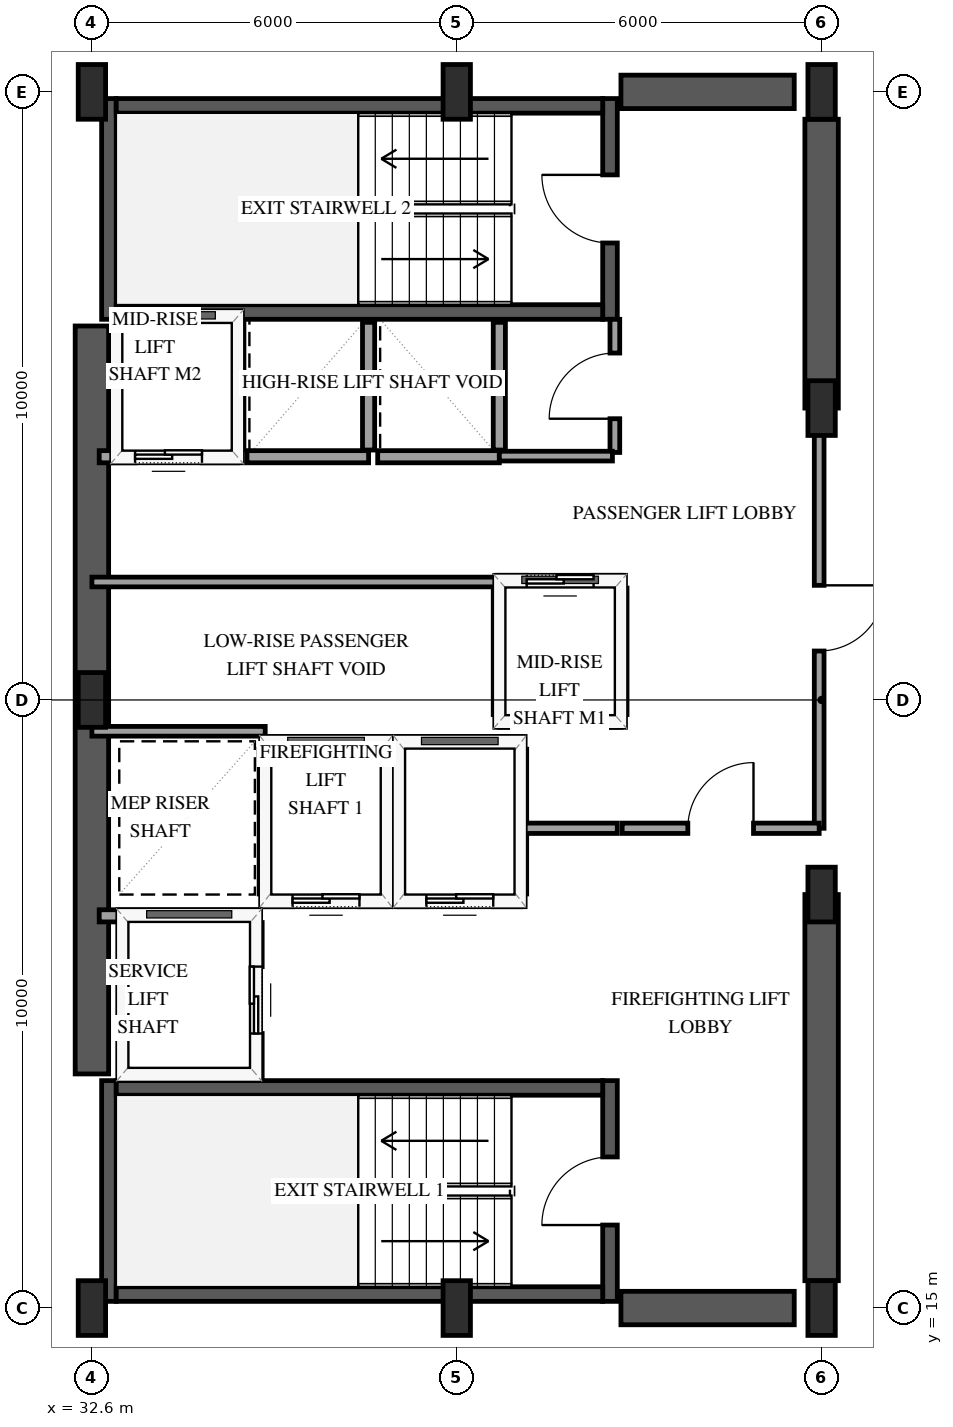
"""IFC4 building model, lengths in metres.
Left out: names, types, materials, properties, quantities, classifications, styles, units other than length and angle.
Written with IfcOpenShell. Run it as: python <this file> out.ifc"""

import sys

from ifc_helpers import new_model, si_unit, direction, frame, frame_2d, origin, origin_2d, place, context, subcontext, project, spatial, rectangle, extrude, element, fill, save


model = new_model("IFC4")
c1 = context("Model", 3, precision=1e-05, world=origin(), true_north=direction((0.0, 1.0)))
c2 = subcontext(c1, "Body", "Model", "MODEL_VIEW")
j1 = project(units=[si_unit("LENGTHUNIT", "METRE"), si_unit("PLANEANGLEUNIT", "RADIAN")], contexts=[c1])
p1 = place(None, origin())
s1 = spatial("IfcSite", under=j1, at=p1, CompositionType="ELEMENT")
p2 = place(p1, origin())
s2 = spatial("IfcBuilding", under=s1, at=p2, CompositionType="ELEMENT")
p3 = place(p2, frame((0.0, 0.0, 139.0)))
s3 = spatial("IfcBuildingStorey", under=s2, at=p3, CompositionType="ELEMENT", Elevation=139.0)
p4 = place(p3, frame((32.88, 15.11, 0.0), z_axis=(0.0, 0.0, 1.0), x_axis=(0.0, 1.0, 0.0)))
e1 = element("IfcWall", 1, at=p4, inside=s3, PredefinedType="SHEAR", context=c2, shape_type="SweptSolid", body=[
    extrude(rectangle(XDim=3.63, YDim=0.24, at=frame_2d((1.815, 0.0))), origin(), (0.0, 0.0, 1.0), 3.6),
])
p5 = place(p3, frame((41.12, 15.11, 0.0), z_axis=(0.0, 0.0, 1.0), x_axis=(0.0, 1.0, 0.0)))
e2 = element("IfcWall", 2, at=p5, inside=s3, PredefinedType="SHEAR", context=c2, shape_type="SweptSolid", body=[
    extrude(rectangle(XDim=3.63, YDim=0.24, at=frame_2d((1.815, 0.0))), origin(), (0.0, 0.0, 1.0), 3.6),
])
p6 = place(p5, frame((1.255, 0.0, 0.0)))
e3 = element("IfcOpeningElement", 3, at=p6, cuts=e2, PredefinedType="OPENING", context=c2, shape_type="SweptSolid", body=[
    extrude(rectangle(XDim=1.12, YDim=2.15, at=frame_2d((0.56, 1.075))), frame((0.0, 0.13, 0.0), z_axis=(0.0, -1.0, 0.0), x_axis=(1.0, 0.0, 0.0)), (0.0, 0.0, 1.0), 0.26),
])
for number, where, z_axis, x_axis in (
    (4, (33.0, 15.23, 0.0), (0.0, 0.0, 1.0), (1.0, 0.0, 0.0)),
    (5, (33.0, 18.62, 0.0), (0.0, 0.0, 1.0), (1.0, 0.0, 0.0)),
):
    element("IfcWall", number, at=place(p3, frame(where, z_axis=z_axis, x_axis=x_axis)), inside=s3, PredefinedType="SHEAR", context=c2, shape_type="SweptSolid", body=[
        extrude(rectangle(XDim=8.0, YDim=0.24, at=frame_2d((4.0, 0.0))), origin(), (0.0, 0.0, 1.0), 3.6),
    ])
p7 = place(p3, frame((32.88, 31.26, 0.0), z_axis=(0.0, 0.0, 1.0), x_axis=(0.0, 1.0, 0.0)))
e6 = element("IfcWall", 6, at=p7, inside=s3, PredefinedType="SHEAR", context=c2, shape_type="SweptSolid", body=[
    extrude(rectangle(XDim=3.63, YDim=0.24, at=frame_2d((1.815, 0.0))), origin(), (0.0, 0.0, 1.0), 3.6),
])
p8 = place(p3, frame((41.12, 31.26, 0.0), z_axis=(0.0, 0.0, 1.0), x_axis=(0.0, 1.0, 0.0)))
e7 = element("IfcWall", 7, at=p8, inside=s3, PredefinedType="SHEAR", context=c2, shape_type="SweptSolid", body=[
    extrude(rectangle(XDim=3.63, YDim=0.24, at=frame_2d((1.815, 0.0))), origin(), (0.0, 0.0, 1.0), 3.6),
])
p9 = place(p8, frame((1.255, 0.0, 0.0)))
e8 = element("IfcOpeningElement", 8, at=p9, cuts=e7, PredefinedType="OPENING", context=c2, shape_type="SweptSolid", body=[
    extrude(rectangle(XDim=1.12, YDim=2.15, at=frame_2d((0.56, 1.075))), frame((0.0, 0.13, 0.0), z_axis=(0.0, -1.0, 0.0), x_axis=(1.0, 0.0, 0.0)), (0.0, 0.0, 1.0), 0.26),
])
for number, where, z_axis, x_axis in (
    (9, (33.0, 31.38, 0.0), (0.0, 0.0, 1.0), (1.0, 0.0, 0.0)),
    (10, (33.0, 34.77, 0.0), (0.0, 0.0, 1.0), (1.0, 0.0, 0.0)),
):
    element("IfcWall", number, at=place(p3, frame(where, z_axis=z_axis, x_axis=x_axis)), inside=s3, PredefinedType="SHEAR", context=c2, shape_type="SweptSolid", body=[
        extrude(rectangle(XDim=8.0, YDim=0.24, at=frame_2d((4.0, 0.0))), origin(), (0.0, 0.0, 1.0), 3.6),
    ])
p10 = place(p3, frame((32.6, 18.85, 0.0), z_axis=(0.0, 0.0, 1.0), x_axis=(0.0, 1.0, 0.0)))
e11 = element("IfcWall", 11, at=p10, inside=s3, PredefinedType="SHEAR", context=c2, shape_type="SweptSolid", body=[
    extrude(rectangle(XDim=12.3, YDim=0.55, at=frame_2d((6.15, 0.0))), origin(), (0.0, 0.0, 1.0), 3.6),
])
for number, where, z_axis, x_axis in (
    (12, (41.3, 15.0, 0.0), (0.0, 0.0, 1.0), (1.0, 0.0, 0.0)),
    (13, (41.3, 35.0, 0.0), (0.0, 0.0, 1.0), (1.0, 0.0, 0.0)),
):
    element("IfcWall", number, at=place(p3, frame(where, z_axis=z_axis, x_axis=x_axis)), inside=s3, PredefinedType="SHEAR", context=c2, shape_type="SweptSolid", body=[
        extrude(rectangle(XDim=2.85, YDim=0.55, at=frame_2d((1.425, 0.0))), origin(), (0.0, 0.0, 1.0), 3.6),
    ])
p11 = place(p3, frame((44.6, 15.45, 0.0), z_axis=(0.0, 0.0, 1.0), x_axis=(0.0, 1.0, 0.0)))
e14 = element("IfcWall", 14, at=p11, inside=s3, PredefinedType="SHEAR", context=c2, shape_type="SweptSolid", body=[
    extrude(rectangle(XDim=6.35, YDim=0.55, at=frame_2d((3.175, 0.0))), origin(), (0.0, 0.0, 1.0), 3.6),
])
p12 = place(p3, frame((44.6, 29.8, 0.0), z_axis=(0.0, 0.0, 1.0), x_axis=(0.0, 1.0, 0.0)))
e15 = element("IfcWall", 15, at=p12, inside=s3, PredefinedType="SHEAR", context=c2, shape_type="SweptSolid", body=[
    extrude(rectangle(XDim=4.75, YDim=0.55, at=frame_2d((2.375, 0.0))), origin(), (0.0, 0.0, 1.0), 3.6),
])
for number, where, z_axis, x_axis in (
    (16, (32.6, 15.0, -0.3), (0.0, 0.0, 1.0), (1.0, 0.0, 0.0)),
    (17, (32.6, 25.0, -0.3), (0.0, 0.0, 1.0), (1.0, 0.0, 0.0)),
    (18, (32.6, 35.0, -0.3), (0.0, 0.0, 1.0), (1.0, 0.0, 0.0)),
    (19, (38.6, 15.0, -0.3), (0.0, 0.0, 1.0), (1.0, 0.0, 0.0)),
    (20, (38.6, 35.0, -0.3), (0.0, 0.0, 1.0), (1.0, 0.0, 0.0)),
    (21, (44.6, 15.0, -0.3), (0.0, 0.0, 1.0), (1.0, 0.0, 0.0)),
    (22, (44.6, 21.8, -0.3), (0.0, 0.0, 1.0), (1.0, 0.0, 0.0)),
    (23, (44.6, 29.8, -0.3), (0.0, 0.0, 1.0), (1.0, 0.0, 0.0)),
    (24, (44.6, 35.0, -0.3), (0.0, 0.0, 1.0), (1.0, 0.0, 0.0)),
):
    element("IfcColumn", number, at=place(p3, frame(where, z_axis=z_axis, x_axis=x_axis)), inside=s3, PredefinedType="PILASTER", context=c2, shape_type="SweptSolid", body=[
        extrude(rectangle(XDim=0.45, YDim=0.9, at=origin_2d()), origin(), (0.0, 0.0, 1.0), 3.9),
    ])
p13 = place(p3, frame((35.45, 21.7, 0.0), z_axis=(0.0, 0.0, 1.0), x_axis=(1.0, 0.0, 0.0)))
e25 = element("IfcWall", 25, at=p13, inside=s3, PredefinedType="SOLIDWALL", context=c2, shape_type="SweptSolid", body=[
    extrude(rectangle(XDim=2.0, YDim=0.2, at=frame_2d((1.0, 0.0))), origin(), (0.0, 0.0, 1.0), 3.3),
])
p14 = place(p13, frame((0.45, 0.0, 0.0)))
e26 = element("IfcOpeningElement", 26, at=p14, cuts=e25, PredefinedType="OPENING", context=c2, shape_type="SweptSolid", body=[
    extrude(rectangle(XDim=1.1, YDim=2.15, at=frame_2d((0.55, 1.075))), frame((0.0, 0.11, 0.0), z_axis=(0.0, -1.0, 0.0), x_axis=(1.0, 0.0, 0.0)), (0.0, 0.0, 1.0), 0.22),
])
p15 = place(p3, frame((35.45, 24.3, 0.0), z_axis=(0.0, 0.0, 1.0), x_axis=(1.0, 0.0, 0.0)))
e27 = element("IfcWall", 27, at=p15, inside=s3, PredefinedType="SOLIDWALL", context=c2, shape_type="SweptSolid", body=[
    extrude(rectangle(XDim=2.0, YDim=0.2, at=frame_2d((1.0, 0.0))), origin(), (0.0, 0.0, 1.0), 3.3),
])
for number, where, z_axis, x_axis in (
    (28, (35.45, 21.81, 0.0), (0.0, 0.0, 1.0), (0.0, 1.0, 0.0)),
    (29, (37.45, 21.81, 0.0), (0.0, 0.0, 1.0), (0.0, 1.0, 0.0)),
):
    element("IfcWall", number, at=place(p3, frame(where, z_axis=z_axis, x_axis=x_axis)), inside=s3, PredefinedType="SOLIDWALL", context=c2, shape_type="SweptSolid", body=[
        extrude(rectangle(XDim=2.38, YDim=0.2, at=frame_2d((1.19, 0.0))), origin(), (0.0, 0.0, 1.0), 3.3),
    ])
p16 = place(p3, frame((37.65, 21.7, 0.0), z_axis=(0.0, 0.0, 1.0), x_axis=(1.0, 0.0, 0.0)))
e30 = element("IfcWall", 30, at=p16, inside=s3, PredefinedType="SOLIDWALL", context=c2, shape_type="SweptSolid", body=[
    extrude(rectangle(XDim=2.0, YDim=0.2, at=frame_2d((1.0, 0.0))), origin(), (0.0, 0.0, 1.0), 3.3),
])
p17 = place(p16, frame((0.45, 0.0, 0.0)))
e31 = element("IfcOpeningElement", 31, at=p17, cuts=e30, PredefinedType="OPENING", context=c2, shape_type="SweptSolid", body=[
    extrude(rectangle(XDim=1.1, YDim=2.15, at=frame_2d((0.55, 1.075))), frame((0.0, 0.11, 0.0), z_axis=(0.0, -1.0, 0.0), x_axis=(1.0, 0.0, 0.0)), (0.0, 0.0, 1.0), 0.22),
])
p18 = place(p3, frame((37.65, 24.3, 0.0), z_axis=(0.0, 0.0, 1.0), x_axis=(1.0, 0.0, 0.0)))
e32 = element("IfcWall", 32, at=p18, inside=s3, PredefinedType="SOLIDWALL", context=c2, shape_type="SweptSolid", body=[
    extrude(rectangle(XDim=2.0, YDim=0.2, at=frame_2d((1.0, 0.0))), origin(), (0.0, 0.0, 1.0), 3.3),
])
p19 = place(p3, frame((39.65, 21.81, 0.0), z_axis=(0.0, 0.0, 1.0), x_axis=(0.0, 1.0, 0.0)))
e33 = element("IfcWall", 33, at=p19, inside=s3, PredefinedType="SOLIDWALL", context=c2, shape_type="SweptSolid", body=[
    extrude(rectangle(XDim=2.38, YDim=0.2, at=frame_2d((1.19, 0.0))), origin(), (0.0, 0.0, 1.0), 3.3),
])
p20 = place(p3, frame((32.72, 21.45, 0.0), z_axis=(0.0, 0.0, 1.0), x_axis=(1.0, 0.0, 0.0)))
e34 = element("IfcWall", 34, at=p20, inside=s3, PredefinedType="SOLIDWALL", context=c2, shape_type="SweptSolid", body=[
    extrude(rectangle(XDim=2.58, YDim=0.2, at=frame_2d((1.29, 0.0))), origin(), (0.0, 0.0, 1.0), 3.3),
])
p21 = place(p3, frame((35.3, 18.79, 0.0), z_axis=(0.0, 0.0, 1.0), x_axis=(0.0, 1.0, 0.0)))
e35 = element("IfcWall", 35, at=p21, inside=s3, PredefinedType="SOLIDWALL", context=c2, shape_type="SweptSolid", body=[
    extrude(rectangle(XDim=2.55, YDim=0.2, at=frame_2d((1.275, 0.0))), origin(), (0.0, 0.0, 1.0), 3.3),
])
p22 = place(p21, frame((0.725, 0.0, 0.0)))
e36 = element("IfcOpeningElement", 36, at=p22, cuts=e35, PredefinedType="OPENING", context=c2, shape_type="SweptSolid", body=[
    extrude(rectangle(XDim=1.1, YDim=2.15, at=frame_2d((0.55, 1.075))), frame((0.0, 0.11, 0.0), z_axis=(0.0, -1.0, 0.0), x_axis=(1.0, 0.0, 0.0)), (0.0, 0.0, 1.0), 0.22),
])
p23 = place(p3, frame((39.3, 24.65, 0.0), z_axis=(0.0, 0.0, 1.0), x_axis=(1.0, 0.0, 0.0)))
e37 = element("IfcWall", 37, at=p23, inside=s3, PredefinedType="SOLIDWALL", context=c2, shape_type="SweptSolid", body=[
    extrude(rectangle(XDim=2.0, YDim=0.2, at=frame_2d((1.0, 0.0))), origin(), (0.0, 0.0, 1.0), 3.3),
])
p24 = place(p3, frame((39.3, 26.95, 0.0), z_axis=(0.0, 0.0, 1.0), x_axis=(1.0, 0.0, 0.0)))
e38 = element("IfcWall", 38, at=p24, inside=s3, PredefinedType="SOLIDWALL", context=c2, shape_type="SweptSolid", body=[
    extrude(rectangle(XDim=2.0, YDim=0.2, at=frame_2d((1.0, 0.0))), origin(), (0.0, 0.0, 1.0), 3.3),
])
p25 = place(p24, frame((0.45, 0.0, 0.0)))
e39 = element("IfcOpeningElement", 39, at=p25, cuts=e38, PredefinedType="OPENING", context=c2, shape_type="SweptSolid", body=[
    extrude(rectangle(XDim=1.1, YDim=2.15, at=frame_2d((0.55, 1.075))), frame((0.0, 0.11, 0.0), z_axis=(0.0, -1.0, 0.0), x_axis=(1.0, 0.0, 0.0)), (0.0, 0.0, 1.0), 0.22),
])
for number, where, z_axis, x_axis in (
    (40, (39.3, 24.76, 0.0), (0.0, 0.0, 1.0), (0.0, 1.0, 0.0)),
    (41, (41.3, 24.76, 0.0), (0.0, 0.0, 1.0), (0.0, 1.0, 0.0)),
):
    element("IfcWall", number, at=place(p3, frame(where, z_axis=z_axis, x_axis=x_axis)), inside=s3, PredefinedType="SOLIDWALL", context=c2, shape_type="SweptSolid", body=[
        extrude(rectangle(XDim=2.08, YDim=0.2, at=frame_2d((1.04, 0.0))), origin(), (0.0, 0.0, 1.0), 3.3),
    ])
p26 = place(p3, frame((32.72, 29.0, 0.0), z_axis=(0.0, 0.0, 1.0), x_axis=(1.0, 0.0, 0.0)))
e42 = element("IfcWall", 42, at=p26, inside=s3, PredefinedType="SOLIDWALL", context=c2, shape_type="SweptSolid", body=[
    extrude(rectangle(XDim=2.28, YDim=0.2, at=frame_2d((1.14, 0.0))), origin(), (0.0, 0.0, 1.0), 3.3),
])
p27 = place(p26, frame((0.59, 0.0, 0.0)))
e43 = element("IfcOpeningElement", 43, at=p27, cuts=e42, PredefinedType="OPENING", context=c2, shape_type="SweptSolid", body=[
    extrude(rectangle(XDim=1.1, YDim=2.15, at=frame_2d((0.55, 1.075))), frame((0.0, 0.11, 0.0), z_axis=(0.0, -1.0, 0.0), x_axis=(1.0, 0.0, 0.0)), (0.0, 0.0, 1.0), 0.22),
])
p28 = place(p3, frame((35.0, 29.11, 0.0), z_axis=(0.0, 0.0, 1.0), x_axis=(0.0, 1.0, 0.0)))
e44 = element("IfcWall", 44, at=p28, inside=s3, PredefinedType="SOLIDWALL", context=c2, shape_type="SweptSolid", body=[
    extrude(rectangle(XDim=2.1, YDim=0.2, at=frame_2d((1.05, 0.0))), origin(), (0.0, 0.0, 1.0), 3.3),
])
p29 = place(p3, frame((35.15, 29.0, 0.0), z_axis=(0.0, 0.0, 1.0), x_axis=(1.0, 0.0, 0.0)))
e45 = element("IfcWall", 45, at=p29, inside=s3, PredefinedType="SOLIDWALL", context=c2, shape_type="SweptSolid", body=[
    extrude(rectangle(XDim=2.0, YDim=0.2, at=frame_2d((1.0, 0.0))), origin(), (0.0, 0.0, 1.0), 3.3),
])
p30 = place(p3, frame((37.15, 29.11, 0.0), z_axis=(0.0, 0.0, 1.0), x_axis=(0.0, 1.0, 0.0)))
e46 = element("IfcWall", 46, at=p30, inside=s3, PredefinedType="SOLIDWALL", context=c2, shape_type="SweptSolid", body=[
    extrude(rectangle(XDim=2.1, YDim=0.2, at=frame_2d((1.05, 0.0))), origin(), (0.0, 0.0, 1.0), 3.3),
])
p31 = place(p3, frame((37.3, 29.0, 0.0), z_axis=(0.0, 0.0, 1.0), x_axis=(1.0, 0.0, 0.0)))
e47 = element("IfcWall", 47, at=p31, inside=s3, PredefinedType="SOLIDWALL", context=c2, shape_type="SweptSolid", body=[
    extrude(rectangle(XDim=2.0, YDim=0.2, at=frame_2d((1.0, 0.0))), origin(), (0.0, 0.0, 1.0), 3.3),
])
p32 = place(p3, frame((39.3, 29.11, 0.0), z_axis=(0.0, 0.0, 1.0), x_axis=(0.0, 1.0, 0.0)))
e48 = element("IfcWall", 48, at=p32, inside=s3, PredefinedType="SOLIDWALL", context=c2, shape_type="SweptSolid", body=[
    extrude(rectangle(XDim=2.1, YDim=0.2, at=frame_2d((1.05, 0.0))), origin(), (0.0, 0.0, 1.0), 3.3),
])
p33 = place(p3, frame((44.56, 29.8, 0.0), z_axis=(0.0, 0.0, 1.0), x_axis=(0.0, -1.0, 0.0)))
e49 = element("IfcWall", 49, at=p33, inside=s3, PredefinedType="PARTITIONING", context=c2, shape_type="SweptSolid", body=[
    extrude(rectangle(XDim=6.91, YDim=0.16, at=frame_2d((3.455, 0.0))), origin(), (0.0, 0.0, 1.0), 2.34),
])
p34 = place(p33, frame((2.915, 0.0, 0.0)))
e50 = element("IfcOpeningElement", 50, at=p34, cuts=e49, PredefinedType="OPENING", context=c2, shape_type="SweptSolid", body=[
    extrude(rectangle(XDim=1.08, YDim=2.15, at=frame_2d((0.54, 1.075))), frame((0.0, 0.09, 0.0), z_axis=(0.0, -1.0, 0.0), x_axis=(1.0, 0.0, 0.0)), (0.0, 0.0, 1.0), 0.18),
])
p35 = place(p3, frame((39.3, 26.94, 0.0), z_axis=(0.0, 0.0, 1.0), x_axis=(-1.0, 0.0, 0.0)))
e51 = element("IfcWall", 51, at=p35, inside=s3, PredefinedType="PARTITIONING", context=c2, shape_type="SweptSolid", body=[
    extrude(rectangle(XDim=6.7, YDim=0.16, at=frame_2d((3.35, 0.0))), origin(), (0.0, 0.0, 1.0), 3.3),
])
p36 = place(p3, frame((41.32, 22.89, 0.0), z_axis=(0.0, 0.0, 1.0), x_axis=(1.0, 0.0, 0.0)))
e52 = element("IfcWall", 52, at=p36, inside=s3, PredefinedType="PARTITIONING", context=c2, shape_type="SweptSolid", body=[
    extrude(rectangle(XDim=3.24, YDim=0.17, at=frame_2d((1.62, 0.0))), origin(), (0.0, 0.0, 1.0), 3.3),
])
p37 = place(p36, frame((1.08, 0.0, 0.0)))
e53 = element("IfcOpeningElement", 53, at=p37, cuts=e52, PredefinedType="OPENING", context=c2, shape_type="SweptSolid", body=[
    extrude(rectangle(XDim=1.08, YDim=2.15, at=frame_2d((0.54, 1.075))), frame((0.0, 0.095, 0.0), z_axis=(0.0, -1.0, 0.0), x_axis=(1.0, 0.0, 0.0)), (0.0, 0.0, 1.0), 0.19),
])
p38 = place(p3, frame((35.45, 24.485, 0.0), z_axis=(0.0, 0.0, 1.0), x_axis=(-1.0, 0.0, 0.0)))
e54 = element("IfcWall", 54, at=p38, inside=s3, PredefinedType="PARTITIONING", context=c2, shape_type="SweptSolid", body=[
    extrude(rectangle(XDim=2.85, YDim=0.16, at=frame_2d((1.425, 0.0))), origin(), (0.0, 0.0, 1.0), 3.3),
])
p39 = place(p3, frame((41.2, 29.07, 0.0), z_axis=(0.0, 0.0, 1.0), x_axis=(0.0, 1.0, 0.0)))
e55 = element("IfcWall", 55, at=p39, inside=s3, PredefinedType="PARTITIONING", context=c2, shape_type="SweptSolid", body=[
    extrude(rectangle(XDim=2.19, YDim=0.16, at=frame_2d((1.095, 0.0))), origin(), (0.0, 0.0, 1.0), 3.3),
])
p40 = place(p39, frame((0.555, 0.0, 0.0)))
e56 = element("IfcOpeningElement", 56, at=p40, cuts=e55, PredefinedType="OPENING", context=c2, shape_type="SweptSolid", body=[
    extrude(rectangle(XDim=1.08, YDim=2.15, at=frame_2d((0.54, 1.075))), frame((0.0, 0.09, 0.0), z_axis=(0.0, -1.0, 0.0), x_axis=(1.0, 0.0, 0.0)), (0.0, 0.0, 1.0), 0.18),
])
p41 = place(p3, frame((39.3, 29.01, 0.0), z_axis=(0.0, 0.0, 1.0), x_axis=(1.0, 0.0, 0.0)))
e57 = element("IfcWall", 57, at=p41, inside=s3, PredefinedType="PARTITIONING", context=c2, shape_type="SweptSolid", body=[
    extrude(rectangle(XDim=1.86, YDim=0.16, at=frame_2d((0.93, 0.0))), origin(), (0.0, 0.0, 1.0), 3.3),
])
p42 = place(p3, frame((39.72, 22.89, 0.0), z_axis=(0.0, 0.0, 1.0), x_axis=(1.0, 0.0, 0.0)))
e58 = element("IfcWall", 58, at=p42, inside=s3, PredefinedType="PARTITIONING", context=c2, shape_type="SweptSolid", body=[
    extrude(rectangle(XDim=1.52, YDim=0.17, at=frame_2d((0.76, 0.0))), origin(), (0.0, 0.0, 1.0), 3.3),
])
p43 = place(p14, origin())
e59 = element("IfcDoor", 59, at=p43, inside=s3, OperationType="SLIDING_TO_LEFT", PredefinedType="DOOR", context=c2, shape_type="SweptSolid", body=[
    extrude(rectangle(XDim=1.1, YDim=2.15, at=frame_2d((0.55, 1.075))), frame((0.0, 0.025, 0.0), z_axis=(0.0, -1.0, 0.0), x_axis=(1.0, 0.0, 0.0)), (0.0, 0.0, 1.0), 0.05),
])
fill(e26, e59)
p44 = place(p17, origin())
e60 = element("IfcDoor", 60, at=p44, inside=s3, OperationType="SLIDING_TO_LEFT", PredefinedType="DOOR", context=c2, shape_type="SweptSolid", body=[
    extrude(rectangle(XDim=1.1, YDim=2.15, at=frame_2d((0.55, 1.075))), frame((0.0, 0.025, 0.0), z_axis=(0.0, -1.0, 0.0), x_axis=(1.0, 0.0, 0.0)), (0.0, 0.0, 1.0), 0.05),
])
fill(e31, e60)
p45 = place(p22, origin())
e61 = element("IfcDoor", 61, at=p45, inside=s3, OperationType="SLIDING_TO_LEFT", PredefinedType="DOOR", context=c2, shape_type="SweptSolid", body=[
    extrude(rectangle(XDim=1.1, YDim=2.15, at=frame_2d((0.55, 1.075))), frame((0.0, 0.025, 0.0), z_axis=(0.0, -1.0, 0.0), x_axis=(1.0, 0.0, 0.0)), (0.0, 0.0, 1.0), 0.05),
])
fill(e36, e61)
p46 = place(p25, origin())
e62 = element("IfcDoor", 62, at=p46, inside=s3, OperationType="SLIDING_TO_LEFT", PredefinedType="DOOR", context=c2, shape_type="SweptSolid", body=[
    extrude(rectangle(XDim=1.1, YDim=2.15, at=frame_2d((0.55, 1.075))), frame((0.0, 0.025, 0.0), z_axis=(0.0, -1.0, 0.0), x_axis=(1.0, 0.0, 0.0)), (0.0, 0.0, 1.0), 0.05),
])
fill(e39, e62)
p47 = place(p27, origin())
e63 = element("IfcDoor", 63, at=p47, inside=s3, OperationType="SLIDING_TO_LEFT", PredefinedType="DOOR", context=c2, shape_type="SweptSolid", body=[
    extrude(rectangle(XDim=1.1, YDim=2.15, at=frame_2d((0.55, 1.075))), frame((0.0, 0.025, 0.0), z_axis=(0.0, -1.0, 0.0), x_axis=(1.0, 0.0, 0.0)), (0.0, 0.0, 1.0), 0.05),
])
fill(e43, e63)
p48 = place(p6, origin())
e64 = element("IfcDoor", 64, at=p48, inside=s3, OperationType="SINGLE_SWING_LEFT", PredefinedType="DOOR", context=c2, shape_type="SweptSolid", body=[
    extrude(rectangle(XDim=1.12, YDim=2.15, at=frame_2d((0.56, 1.075))), frame((0.0, 0.025, 0.0), z_axis=(0.0, -1.0, 0.0), x_axis=(1.0, 0.0, 0.0)), (0.0, 0.0, 1.0), 0.05),
])
fill(e3, e64)
p49 = place(p9, origin())
e65 = element("IfcDoor", 65, at=p49, inside=s3, OperationType="SINGLE_SWING_RIGHT", PredefinedType="DOOR", context=c2, shape_type="SweptSolid", body=[
    extrude(rectangle(XDim=1.12, YDim=2.15, at=frame_2d((0.56, 1.075))), frame((0.0, 0.025, 0.0), z_axis=(0.0, -1.0, 0.0), x_axis=(1.0, 0.0, 0.0)), (0.0, 0.0, 1.0), 0.05),
])
fill(e8, e65)
p50 = place(p34, origin())
e66 = element("IfcDoor", 66, at=p50, inside=s3, OperationType="SINGLE_SWING_LEFT", PredefinedType="DOOR", context=c2, shape_type="SweptSolid", body=[
    extrude(rectangle(XDim=1.08, YDim=2.15, at=frame_2d((0.54, 1.075))), frame((0.0, 0.025, 0.0), z_axis=(0.0, -1.0, 0.0), x_axis=(1.0, 0.0, 0.0)), (0.0, 0.0, 1.0), 0.05),
])
fill(e50, e66)
p51 = place(p37, origin())
e67 = element("IfcDoor", 67, at=p51, inside=s3, OperationType="SINGLE_SWING_RIGHT", PredefinedType="DOOR", context=c2, shape_type="SweptSolid", body=[
    extrude(rectangle(XDim=1.08, YDim=2.15, at=frame_2d((0.54, 1.075))), frame((0.0, 0.025, 0.0), z_axis=(0.0, -1.0, 0.0), x_axis=(1.0, 0.0, 0.0)), (0.0, 0.0, 1.0), 0.05),
])
fill(e53, e67)
p52 = place(p40, origin())
e68 = element("IfcDoor", 68, at=p52, inside=s3, OperationType="SINGLE_SWING_LEFT", PredefinedType="DOOR", context=c2, shape_type="SweptSolid", body=[
    extrude(rectangle(XDim=1.08, YDim=2.15, at=frame_2d((0.54, 1.075))), frame((0.0, 0.025, 0.0), z_axis=(0.0, -1.0, 0.0), x_axis=(1.0, 0.0, 0.0)), (0.0, 0.0, 1.0), 0.05),
])
fill(e56, e68)
save(model, sys.argv[1])
